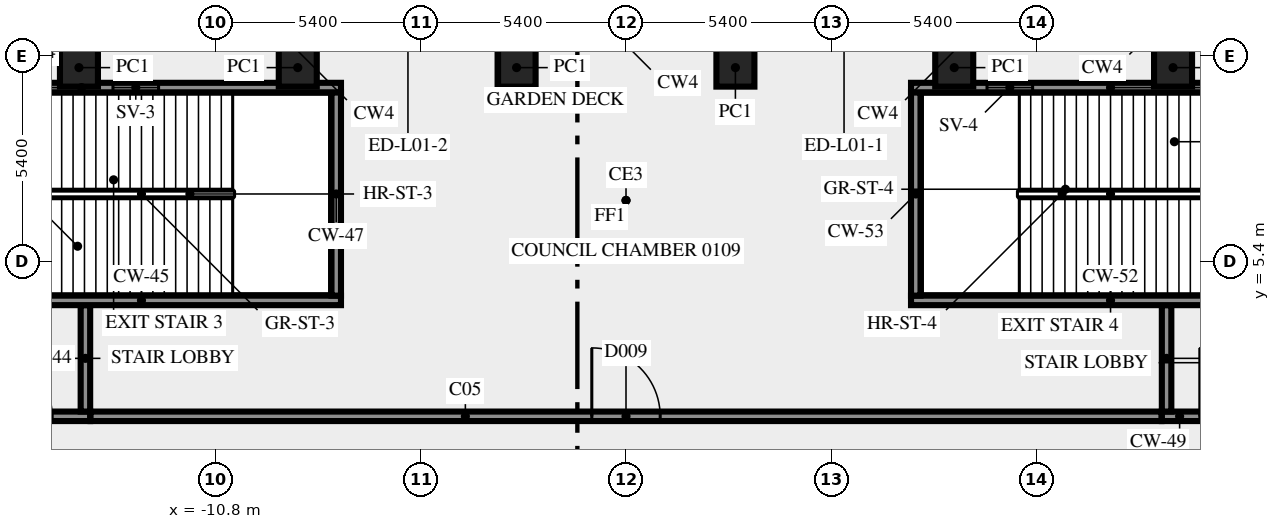
"""IFC4 building model, lengths in metres.
Left out: names, types, materials, properties, quantities, classifications, styles, units other than length and angle.
Written with IfcOpenShell. Run it as: python <this file> out.ifc"""

import sys

from ifc_helpers import new_model, si_unit, direction, frame, frame_2d, origin, origin_2d, place, context, subcontext, project, spatial, rectangle, extrude, element, fill, save


model = new_model("IFC4")
c1 = context("Model", 3, precision=1e-05, world=origin(), true_north=direction((0.0, 1.0)))
c2 = subcontext(c1, "Body", "Model", "MODEL_VIEW")
j1 = project(units=[si_unit("LENGTHUNIT", "METRE"), si_unit("PLANEANGLEUNIT", "RADIAN")], contexts=[c1])
p1 = place(None, origin())
s1 = spatial("IfcSite", under=j1, at=p1, CompositionType="ELEMENT")
p2 = place(p1, origin())
s2 = spatial("IfcBuilding", under=s1, at=p2, CompositionType="ELEMENT")
p3 = place(p2, frame((0.0, 0.0, 6.0)))
s3 = spatial("IfcBuildingStorey", under=s2, at=p3, CompositionType="ELEMENT", Elevation=6.0)
for number, where, z_axis, x_axis in (
    (1, (14.395, 10.5, 0.0), (0.0, 0.0, 1.0), (-1.0, 0.0, 0.0)),
    (2, (8.637, 10.5, 0.0), (0.0, 0.0, 1.0), (-1.0, 0.0, 0.0)),
    (3, (2.879, 10.5, 0.0), (0.0, 0.0, 1.0), (-1.0, 0.0, 0.0)),
    (4, (-2.879, 10.5, 0.0), (0.0, 0.0, 1.0), (-1.0, 0.0, 0.0)),
    (5, (-8.637, 10.5, 0.0), (0.0, 0.0, 1.0), (-1.0, 0.0, 0.0)),
    (6, (-14.395, 10.5, 0.0), (0.0, 0.0, 1.0), (-1.0, 0.0, 0.0)),
):
    element("IfcColumn", number, at=place(p3, frame(where, z_axis=z_axis, x_axis=x_axis)), inside=s3, PredefinedType="COLUMN", context=c2, shape_type="SweptSolid", body=[
        extrude(rectangle(XDim=1.0, YDim=1.0, at=origin_2d()), origin(), (0.0, 0.0, 1.0), 5.1),
    ])
p4 = place(p3, frame((-18.0, 1.325, 0.0), z_axis=(0.0, 0.0, 1.0), x_axis=(1.0, 0.0, 0.0)))
e7 = element("IfcWall", 7, at=p4, inside=s3, PredefinedType="SHEAR", context=c2, shape_type="SweptSolid", body=[
    extrude(rectangle(XDim=3.9, YDim=0.25, at=frame_2d((1.95, 0.0))), origin(), (0.0, 0.0, 1.0), 5.1),
])
p5 = place(p4, frame((1.1, 0.0, 0.0)))
e8 = element("IfcOpeningElement", 8, at=p5, cuts=e7, PredefinedType="OPENING", context=c2, shape_type="SweptSolid", body=[
    extrude(rectangle(XDim=1.8, YDim=2.1, at=frame_2d((0.9, 1.05))), frame((0.0, 0.135, 0.0), z_axis=(0.0, -1.0, 0.0), x_axis=(1.0, 0.0, 0.0)), (0.0, 0.0, 1.0), 0.27),
])
p6 = place(p3, frame((-14.225, 1.45, 0.0), z_axis=(0.0, 0.0, 1.0), x_axis=(0.0, 1.0, 0.0)))
e9 = element("IfcWall", 9, at=p6, inside=s3, PredefinedType="SHEAR", context=c2, shape_type="SweptSolid", body=[
    extrude(rectangle(XDim=2.8, YDim=0.25, at=frame_2d((1.4, 0.0))), origin(), (0.0, 0.0, 1.0), 5.1),
])
p7 = place(p3, frame((-18.0, 4.375, 0.0), z_axis=(0.0, 0.0, 1.0), x_axis=(1.0, 0.0, 0.0)))
e10 = element("IfcWall", 10, at=p7, inside=s3, PredefinedType="SHEAR", context=c2, shape_type="SweptSolid", body=[
    extrude(rectangle(XDim=10.5, YDim=0.25, at=frame_2d((5.25, 0.0))), origin(), (0.0, 0.0, 1.0), 5.1),
])
p8 = place(p7, frame((0.3, 0.0, 0.0)))
e11 = element("IfcOpeningElement", 11, at=p8, cuts=e10, PredefinedType="OPENING", context=c2, shape_type="SweptSolid", body=[
    extrude(rectangle(XDim=1.8, YDim=2.1, at=frame_2d((0.9, 1.05))), frame((0.0, 0.135, 0.0), z_axis=(0.0, -1.0, 0.0), x_axis=(1.0, 0.0, 0.0)), (0.0, 0.0, 1.0), 0.27),
])
p9 = place(p3, frame((-7.625, 4.5, 0.0), z_axis=(0.0, 0.0, 1.0), x_axis=(0.0, 1.0, 0.0)))
e12 = element("IfcWall", 12, at=p9, inside=s3, PredefinedType="SHEAR", context=c2, shape_type="SweptSolid", body=[
    extrude(rectangle(XDim=5.35, YDim=0.25, at=frame_2d((2.675, 0.0))), origin(), (0.0, 0.0, 1.0), 5.1),
])
p10 = place(p3, frame((-18.0, 9.975, 0.0), z_axis=(0.0, 0.0, 1.0), x_axis=(1.0, 0.0, 0.0)))
e13 = element("IfcWall", 13, at=p10, inside=s3, PredefinedType="SHEAR", context=c2, shape_type="SweptSolid", body=[
    extrude(rectangle(XDim=10.5, YDim=0.25, at=frame_2d((5.25, 0.0))), origin(), (0.0, 0.0, 1.0), 5.1),
])
p11 = place(p10, frame((4.5, 0.0, 1.0)))
e14 = element("IfcOpeningElement", 14, at=p11, cuts=e13, PredefinedType="OPENING", context=c2, shape_type="SweptSolid", body=[
    extrude(rectangle(XDim=1.2, YDim=1.2, at=frame_2d((0.6, 0.6))), frame((0.0, 0.135, 0.0), z_axis=(0.0, -1.0, 0.0), x_axis=(1.0, 0.0, 0.0)), (0.0, 0.0, 1.0), 0.27),
])
p12 = place(p3, frame((14.1, 1.325, 0.0), z_axis=(0.0, 0.0, 1.0), x_axis=(1.0, 0.0, 0.0)))
e15 = element("IfcWall", 15, at=p12, inside=s3, PredefinedType="SHEAR", context=c2, shape_type="SweptSolid", body=[
    extrude(rectangle(XDim=3.9, YDim=0.25, at=frame_2d((1.95, 0.0))), origin(), (0.0, 0.0, 1.0), 5.1),
])
p13 = place(p12, frame((1.0, 0.0, 0.0)))
e16 = element("IfcOpeningElement", 16, at=p13, cuts=e15, PredefinedType="OPENING", context=c2, shape_type="SweptSolid", body=[
    extrude(rectangle(XDim=1.8, YDim=2.1, at=frame_2d((0.9, 1.05))), frame((0.0, 0.135, 0.0), z_axis=(0.0, -1.0, 0.0), x_axis=(1.0, 0.0, 0.0)), (0.0, 0.0, 1.0), 0.27),
])
p14 = place(p3, frame((14.225, 1.45, 0.0), z_axis=(0.0, 0.0, 1.0), x_axis=(0.0, 1.0, 0.0)))
e17 = element("IfcWall", 17, at=p14, inside=s3, PredefinedType="SHEAR", context=c2, shape_type="SweptSolid", body=[
    extrude(rectangle(XDim=2.8, YDim=0.25, at=frame_2d((1.4, 0.0))), origin(), (0.0, 0.0, 1.0), 5.1),
])
p15 = place(p3, frame((7.5, 4.375, 0.0), z_axis=(0.0, 0.0, 1.0), x_axis=(1.0, 0.0, 0.0)))
e18 = element("IfcWall", 18, at=p15, inside=s3, PredefinedType="SHEAR", context=c2, shape_type="SweptSolid", body=[
    extrude(rectangle(XDim=10.5, YDim=0.25, at=frame_2d((5.25, 0.0))), origin(), (0.0, 0.0, 1.0), 5.1),
])
p16 = place(p15, frame((8.4, 0.0, 0.0)))
e19 = element("IfcOpeningElement", 19, at=p16, cuts=e18, PredefinedType="OPENING", context=c2, shape_type="SweptSolid", body=[
    extrude(rectangle(XDim=1.8, YDim=2.1, at=frame_2d((0.9, 1.05))), frame((0.0, 0.135, 0.0), z_axis=(0.0, -1.0, 0.0), x_axis=(1.0, 0.0, 0.0)), (0.0, 0.0, 1.0), 0.27),
])
p17 = place(p3, frame((7.625, 4.5, 0.0), z_axis=(0.0, 0.0, 1.0), x_axis=(0.0, 1.0, 0.0)))
e20 = element("IfcWall", 20, at=p17, inside=s3, PredefinedType="SHEAR", context=c2, shape_type="SweptSolid", body=[
    extrude(rectangle(XDim=5.35, YDim=0.25, at=frame_2d((2.675, 0.0))), origin(), (0.0, 0.0, 1.0), 5.1),
])
p18 = place(p3, frame((7.5, 9.975, 0.0), z_axis=(0.0, 0.0, 1.0), x_axis=(1.0, 0.0, 0.0)))
e21 = element("IfcWall", 21, at=p18, inside=s3, PredefinedType="SHEAR", context=c2, shape_type="SweptSolid", body=[
    extrude(rectangle(XDim=10.5, YDim=0.25, at=frame_2d((5.25, 0.0))), origin(), (0.0, 0.0, 1.0), 5.1),
])
p19 = place(p18, frame((2.0, 0.0, 1.0)))
e22 = element("IfcOpeningElement", 22, at=p19, cuts=e21, PredefinedType="OPENING", context=c2, shape_type="SweptSolid", body=[
    extrude(rectangle(XDim=1.2, YDim=1.2, at=frame_2d((0.6, 0.6))), frame((0.0, 0.135, 0.0), z_axis=(0.0, -1.0, 0.0), x_axis=(1.0, 0.0, 0.0)), (0.0, 0.0, 1.0), 0.27),
])
p20 = place(p3, frame((-14.09, 1.325, 0.0), z_axis=(0.0, 0.0, 1.0), x_axis=(1.0, 0.0, 0.0)))
e23 = element("IfcWall", 23, at=p20, inside=s3, PredefinedType="SOLIDWALL", context=c2, shape_type="SweptSolid", body=[
    extrude(rectangle(XDim=28.18, YDim=0.25, at=frame_2d((14.09, 0.0))), origin(), (0.0, 0.0, 1.0), 5.1),
])
p21 = place(p20, frame((13.19, 0.0, 0.0)))
e24 = element("IfcOpeningElement", 24, at=p21, cuts=e23, PredefinedType="OPENING", context=c2, shape_type="SweptSolid", body=[
    extrude(rectangle(XDim=1.8, YDim=2.1, at=frame_2d((0.9, 1.05))), frame((0.0, 0.135, 0.0), z_axis=(0.0, -1.0, 0.0), x_axis=(1.0, 0.0, 0.0)), (0.0, 0.0, 1.0), 0.27),
])
p22 = place(p5, origin())
e25 = element("IfcDoor", 25, at=p22, inside=s3, OperationType="DOUBLE_DOOR_SINGLE_SWING", PredefinedType="DOOR", context=c2, shape_type="SweptSolid", body=[
    extrude(rectangle(XDim=1.8, YDim=2.1, at=frame_2d((0.9, 1.05))), frame((0.0, 0.025, 0.0), z_axis=(0.0, -1.0, 0.0), x_axis=(1.0, 0.0, 0.0)), (0.0, 0.0, 1.0), 0.05),
])
fill(e8, e25)
p23 = place(p11, origin())
e26 = element("IfcWindow", 26, at=p23, inside=s3, PartitioningType="SINGLE_PANEL", PredefinedType="WINDOW", context=c2, shape_type="SweptSolid", body=[
    extrude(rectangle(XDim=1.2, YDim=1.2, at=frame_2d((0.6, 0.6))), frame((0.0, 0.03, 0.0), z_axis=(0.0, -1.0, 0.0), x_axis=(1.0, 0.0, 0.0)), (0.0, 0.0, 1.0), 0.06),
])
fill(e14, e26)
p24 = place(p13, origin())
e27 = element("IfcDoor", 27, at=p24, inside=s3, OperationType="DOUBLE_DOOR_SINGLE_SWING", PredefinedType="DOOR", context=c2, shape_type="SweptSolid", body=[
    extrude(rectangle(XDim=1.8, YDim=2.1, at=frame_2d((0.9, 1.05))), frame((0.0, 0.025, 0.0), z_axis=(0.0, -1.0, 0.0), x_axis=(1.0, 0.0, 0.0)), (0.0, 0.0, 1.0), 0.05),
])
fill(e16, e27)
p25 = place(p19, origin())
e28 = element("IfcWindow", 28, at=p25, inside=s3, PartitioningType="SINGLE_PANEL", PredefinedType="WINDOW", context=c2, shape_type="SweptSolid", body=[
    extrude(rectangle(XDim=1.2, YDim=1.2, at=frame_2d((0.6, 0.6))), frame((0.0, 0.03, 0.0), z_axis=(0.0, -1.0, 0.0), x_axis=(1.0, 0.0, 0.0)), (0.0, 0.0, 1.0), 0.06),
])
fill(e22, e28)
p26 = place(p21, origin())
e29 = element("IfcDoor", 29, at=p26, inside=s3, OperationType="DOUBLE_DOOR_SINGLE_SWING", PredefinedType="DOOR", context=c2, shape_type="SweptSolid", body=[
    extrude(rectangle(XDim=1.8, YDim=2.1, at=frame_2d((0.9, 1.05))), frame((0.0, 0.025, 0.0), z_axis=(0.0, -1.0, 0.0), x_axis=(1.0, 0.0, 0.0)), (0.0, 0.0, 1.0), 0.05),
])
fill(e24, e29)
save(model, sys.argv[1])
